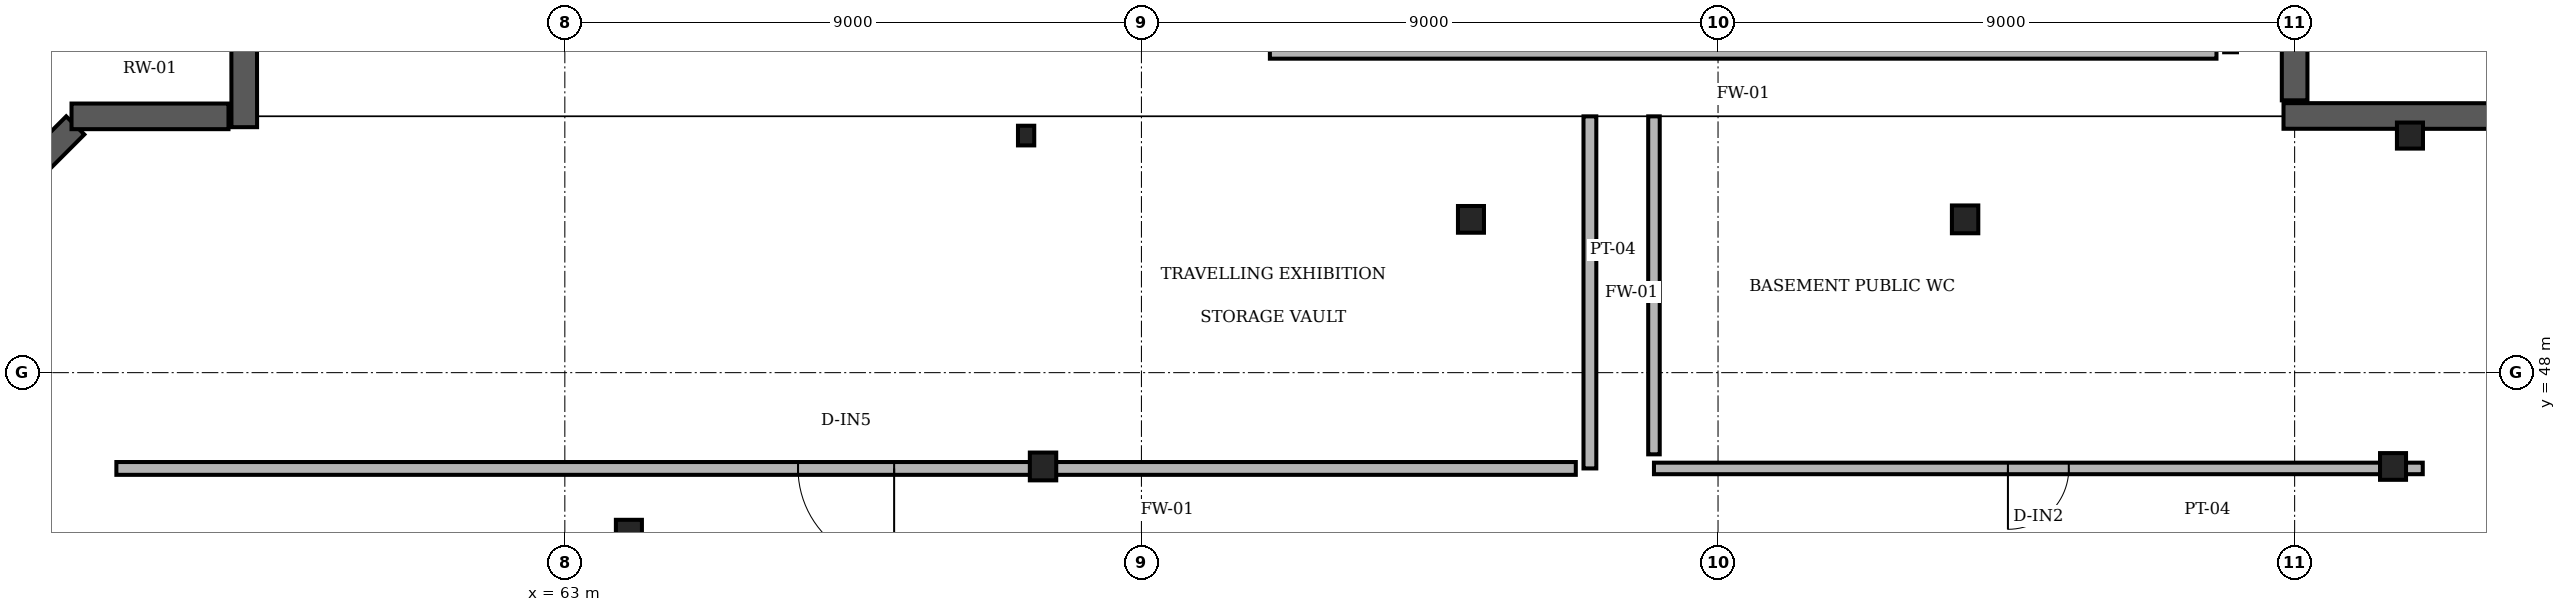
"""IFC4 building model, lengths in metres.
Left out: names, types, materials, properties, quantities, classifications, styles, units other than length and angle.
Written with IfcOpenShell. Run it as: python <this file> out.ifc"""

import sys

from ifc_helpers import new_model, si_unit, direction, frame, frame_2d, origin, origin_2d, place, context, subcontext, project, spatial, rectangle, hollow_circle, i_section, extrude, element, fill, save


model = new_model("IFC4")
c1 = context("Model", 3, precision=1e-05, world=origin(), true_north=direction((0.0, 1.0)))
c2 = subcontext(c1, "Body", "Model", "MODEL_VIEW")
j1 = project(units=[si_unit("LENGTHUNIT", "METRE"), si_unit("PLANEANGLEUNIT", "RADIAN")], contexts=[c1])
p1 = place(None, origin())
s1 = spatial("IfcSite", under=j1, at=p1, CompositionType="ELEMENT")
p2 = place(p1, origin())
s2 = spatial("IfcBuilding", under=s1, at=p2, CompositionType="ELEMENT")
p3 = place(p2, frame((0.0, 0.0, -4.8)))
s3 = spatial("IfcBuildingStorey", under=s2, at=p3, CompositionType="ELEMENT", Elevation=-4.8)
p4 = place(p3, frame((91.536, 46.536, -0.35), z_axis=(0.0, 0.0, 1.0), x_axis=(1.0, 0.0, 0.0)))
e1 = element("IfcColumn", 1, at=p4, inside=s3, PredefinedType="COLUMN", context=c2, shape_type="SweptSolid", body=[
    extrude(i_section(OverallWidth=0.406, OverallDepth=0.417, WebThickness=0.03, FlangeThickness=0.044, FilletRadius=0.015, at=origin_2d()), origin(), (0.0, 0.0, 1.0), 5.15),
])
p5 = place(p3, frame((84.856, 50.392, -0.35), z_axis=(0.0, 0.0, 1.0), x_axis=(1.0, 0.0, 0.0)))
e2 = element("IfcColumn", 2, at=p5, inside=s3, PredefinedType="COLUMN", context=c2, shape_type="SweptSolid", body=[
    extrude(i_section(OverallWidth=0.412, OverallDepth=0.434, WebThickness=0.036, FlangeThickness=0.044, FilletRadius=0.015, at=origin_2d()), origin(), (0.0, 0.0, 1.0), 5.15),
])
p6 = place(p3, frame((77.144, 50.392, -0.35), z_axis=(0.0, 0.0, 1.0), x_axis=(1.0, 0.0, 0.0)))
e3 = element("IfcColumn", 3, at=p6, inside=s3, PredefinedType="COLUMN", context=c2, shape_type="SweptSolid", body=[
    extrude(i_section(OverallWidth=0.406, OverallDepth=0.417, WebThickness=0.03, FlangeThickness=0.044, FilletRadius=0.015, at=origin_2d()), origin(), (0.0, 0.0, 1.0), 5.15),
])
p7 = place(p3, frame((70.464, 46.536, -0.35), z_axis=(0.0, 0.0, 1.0), x_axis=(1.0, 0.0, 0.0)))
e4 = element("IfcColumn", 4, at=p7, inside=s3, PredefinedType="COLUMN", context=c2, shape_type="SweptSolid", body=[
    extrude(i_section(OverallWidth=0.412, OverallDepth=0.434, WebThickness=0.036, FlangeThickness=0.044, FilletRadius=0.015, at=origin_2d()), origin(), (0.0, 0.0, 1.0), 5.15),
])
p8 = place(p3, frame((91.8, 51.7, -0.35), z_axis=(0.0, 0.0, 1.0), x_axis=(1.0, 0.0, 0.0)))
e5 = element("IfcColumn", 5, at=p8, inside=s3, PredefinedType="COLUMN", context=c2, shape_type="SweptSolid", body=[
    extrude(hollow_circle(Radius=0.203, WallThickness=0.015, at=origin_2d()), origin(), (0.0, 0.0, 1.0), 5.15),
])
p9 = place(p3, frame((70.2, 51.7, -0.35), z_axis=(0.0, 0.0, 1.0), x_axis=(1.0, 0.0, 0.0)))
e6 = element("IfcColumn", 6, at=p9, inside=s3, PredefinedType="COLUMN", context=c2, shape_type="SweptSolid", body=[
    extrude(i_section(OverallWidth=0.254, OverallDepth=0.307, WebThickness=0.009, FlangeThickness=0.015, FilletRadius=0.013, at=origin_2d()), origin(), (0.0, 0.0, 1.0), 5.15),
])
p10 = place(p3, frame((64.0, 45.5, -0.35), z_axis=(0.0, 0.0, 1.0), x_axis=(1.0, 0.0, 0.0)))
e7 = element("IfcColumn", 7, at=p10, inside=s3, PredefinedType="COLUMN", context=c2, shape_type="SweptSolid", body=[
    extrude(hollow_circle(Radius=0.203, WallThickness=0.015, at=origin_2d()), origin(), (0.0, 0.0, 1.0), 5.15),
])
p11 = place(p3, frame((53.859, 50.359, -0.35), z_axis=(0.0, 0.0, 1.0), x_axis=(0.707164328025, 0.707049229664, 0.0)))
e8 = element("IfcWall", 8, at=p11, inside=s3, PredefinedType="USERDEFINED", context=c2, shape_type="SweptSolid", body=[
    extrude(rectangle(XDim=2.121, YDim=0.4, at=frame_2d((1.061, 0.0))), origin(), (0.0, 0.0, 1.0), 3.9),
])
p12 = place(p3, frame((55.3, 52.0, -0.35), z_axis=(0.0, 0.0, 1.0), x_axis=(1.0, 0.0, 0.0)))
e9 = element("IfcWall", 9, at=p12, inside=s3, PredefinedType="USERDEFINED", context=c2, shape_type="SweptSolid", body=[
    extrude(rectangle(XDim=2.45, YDim=0.4, at=frame_2d((1.225, 0.0))), origin(), (0.0, 0.0, 1.0), 3.9),
])
p13 = place(p3, frame((57.996, 51.831, -0.35), z_axis=(0.0, 0.0, 1.0), x_axis=(-0.000982993725, 0.999999516862, 0.0)))
e10 = element("IfcWall", 10, at=p13, inside=s3, PredefinedType="USERDEFINED", context=c2, shape_type="SweptSolid", body=[
    extrude(rectangle(XDim=7.451, YDim=0.4, at=frame_2d((3.726, 0.0))), origin(), (0.0, 0.0, 1.0), 3.9),
])
p14 = place(p3, frame((90.0, 88.7, -0.35), z_axis=(0.0, 0.0, 1.0), x_axis=(0.0, -1.0, 0.0)))
e11 = element("IfcWall", 11, at=p14, inside=s3, PredefinedType="USERDEFINED", context=c2, shape_type="SweptSolid", body=[
    extrude(rectangle(XDim=36.45, YDim=0.4, at=frame_2d((18.225, 0.0))), origin(), (0.0, 0.0, 1.0), 3.9),
])
p15 = place(p3, frame((89.826, 52.006, -0.35), z_axis=(0.0, 0.0, 1.0), x_axis=(0.999999931364, -0.000370502079, 0.0)))
e12 = element("IfcWall", 12, at=p15, inside=s3, PredefinedType="USERDEFINED", context=c2, shape_type="SweptSolid", body=[
    extrude(rectangle(XDim=16.474, YDim=0.4, at=frame_2d((8.237, 0.0))), origin(), (0.0, 0.0, 1.0), 3.9),
])
p16 = place(p3, frame((79.0, 52.0, 0.0), z_axis=(0.0, 0.0, 1.0), x_axis=(0.0, -1.0, 0.0)))
e13 = element("IfcWall", 13, at=p16, inside=s3, PredefinedType="SOLIDWALL", context=c2, shape_type="SweptSolid", body=[
    extrude(rectangle(XDim=5.495, YDim=0.2, at=frame_2d((2.748, 0.0))), origin(), (0.0, 0.0, 1.0), 3.15),
])
p17 = place(p3, frame((78.78, 46.505, 0.0), z_axis=(0.0, 0.0, 1.0), x_axis=(-1.0, 0.0, 0.0)))
e14 = element("IfcWall", 14, at=p17, inside=s3, PredefinedType="SOLIDWALL", context=c2, shape_type="SweptSolid", body=[
    extrude(rectangle(XDim=22.78, YDim=0.2, at=frame_2d((11.39, 0.0))), origin(), (0.0, 0.0, 1.0), 3.15),
])
p18 = place(p17, frame((10.64, 0.0, 0.0)))
e15 = element("IfcOpeningElement", 15, at=p18, cuts=e14, PredefinedType="OPENING", context=c2, shape_type="SweptSolid", body=[
    extrude(rectangle(XDim=1.5, YDim=2.2, at=frame_2d((0.75, 1.1))), frame((0.0, 0.11, 0.0), z_axis=(0.0, -1.0, 0.0), x_axis=(1.0, 0.0, 0.0)), (0.0, 0.0, 1.0), 0.22),
])
p19 = place(p3, frame((92.0, 46.505, 0.0), z_axis=(0.0, 0.0, 1.0), x_axis=(-1.0, 0.0, 0.0)))
e16 = element("IfcWall", 16, at=p19, inside=s3, PredefinedType="PARTITIONING", context=c2, shape_type="SweptSolid", body=[
    extrude(rectangle(XDim=12.0, YDim=0.18, at=frame_2d((6.0, 0.0))), origin(), (0.0, 0.0, 1.0), 3.15),
])
p20 = place(p19, frame((5.525, 0.0, 0.0)))
e17 = element("IfcOpeningElement", 17, at=p20, cuts=e16, PredefinedType="OPENING", context=c2, shape_type="SweptSolid", body=[
    extrude(rectangle(XDim=0.95, YDim=2.15, at=frame_2d((0.475, 1.075))), frame((0.0, 0.1, 0.0), z_axis=(0.0, -1.0, 0.0), x_axis=(1.0, 0.0, 0.0)), (0.0, 0.0, 1.0), 0.2),
])
p21 = place(p3, frame((80.0, 46.725, 0.0), z_axis=(0.0, 0.0, 1.0), x_axis=(0.0, 1.0, 0.0)))
e18 = element("IfcWall", 18, at=p21, inside=s3, PredefinedType="PARTITIONING", context=c2, shape_type="SweptSolid", body=[
    extrude(rectangle(XDim=5.275, YDim=0.18, at=frame_2d((2.637, 0.0))), origin(), (0.0, 0.0, 1.0), 3.15),
])
p22 = place(p3, frame((88.78, 53.0, 0.0), z_axis=(0.0, 0.0, 1.0), x_axis=(-1.0, 0.0, 0.0)))
e19 = element("IfcWall", 19, at=p22, inside=s3, PredefinedType="SOLIDWALL", context=c2, shape_type="SweptSolid", body=[
    extrude(rectangle(XDim=14.775, YDim=0.2, at=frame_2d((7.388, 0.0))), origin(), (0.0, 0.0, 1.0), 3.15),
])
p23 = place(p18, origin())
e20 = element("IfcDoor", 20, at=p23, inside=s3, OperationType="SINGLE_SWING_LEFT", PredefinedType="DOOR", context=c2, shape_type="SweptSolid", body=[
    extrude(rectangle(XDim=1.5, YDim=2.2, at=frame_2d((0.75, 1.1))), frame((0.0, 0.025, 0.0), z_axis=(0.0, -1.0, 0.0), x_axis=(1.0, 0.0, 0.0)), (0.0, 0.0, 1.0), 0.05),
])
fill(e15, e20)
p24 = place(p20, origin())
e21 = element("IfcDoor", 21, at=p24, inside=s3, OperationType="SINGLE_SWING_RIGHT", PredefinedType="DOOR", context=c2, shape_type="SweptSolid", body=[
    extrude(rectangle(XDim=0.95, YDim=2.15, at=frame_2d((0.475, 1.075))), frame((0.0, 0.025, 0.0), z_axis=(0.0, -1.0, 0.0), x_axis=(1.0, 0.0, 0.0)), (0.0, 0.0, 1.0), 0.05),
])
fill(e17, e21)
save(model, sys.argv[1])
